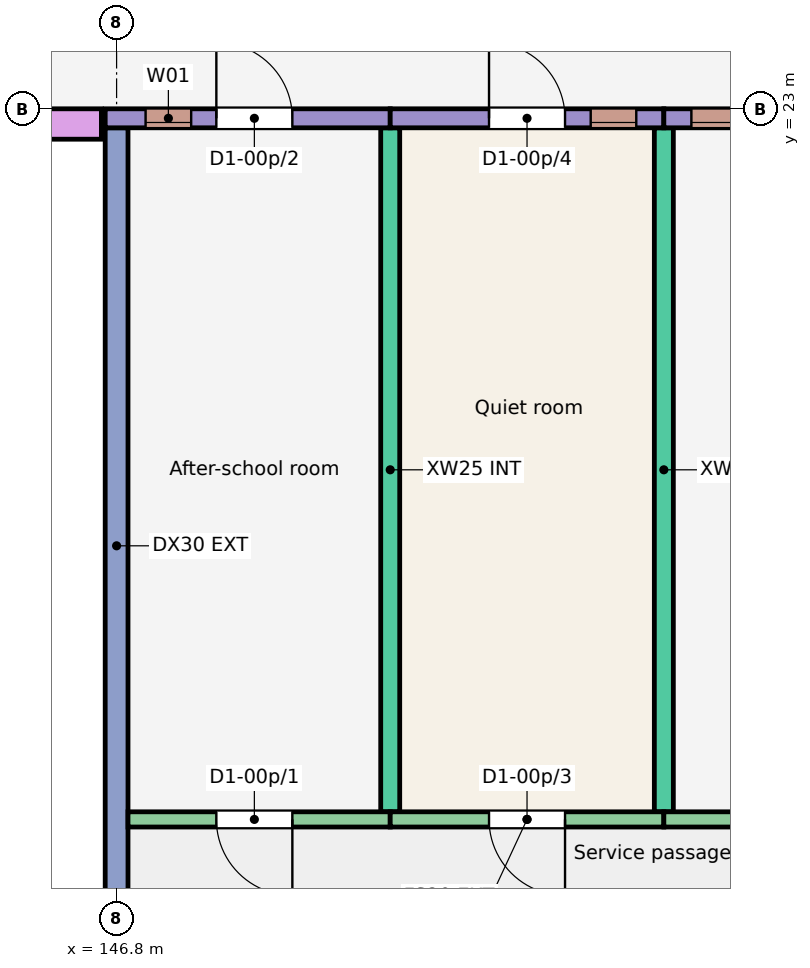
"""IFC4 building model, lengths in metres.
Left out: names, types, materials, properties, quantities, classifications, styles, units other than length and angle.
Written with IfcOpenShell. Run it as: python <this file> out.ifc"""

import sys

from ifc_helpers import new_model, si_unit, direction, frame, frame_2d, origin, place, context, subcontext, project, spatial, rectangle, extrude, element, fill, save


model = new_model("IFC4")
c1 = context("Model", 3, precision=1e-05, world=origin(), true_north=direction((0.0, 1.0)))
c2 = subcontext(c1, "Body", "Model", "MODEL_VIEW")
j1 = project(units=[si_unit("LENGTHUNIT", "METRE"), si_unit("PLANEANGLEUNIT", "RADIAN")], contexts=[c1])
p1 = place(None, origin())
s1 = spatial("IfcSite", under=j1, at=p1, CompositionType="ELEMENT")
p2 = place(p1, origin())
s2 = spatial("IfcBuilding", under=s1, at=p2, CompositionType="ELEMENT")
p3 = place(p2, origin())
s3 = spatial("IfcBuildingStorey", under=s2, at=p3, CompositionType="ELEMENT", Elevation=0.0)
p4 = place(p3, frame((146.8, 11.75, -0.25), z_axis=(0.0, 0.0, 1.0), x_axis=(0.0, 1.0, 0.0)))
e1 = element("IfcWall", 1, at=p4, inside=s3, PredefinedType="SHEAR", context=c2, shape_type="SweptSolid", body=[
    extrude(rectangle(XDim=11.0, YDim=0.3, at=frame_2d((5.5, 0.0))), origin(), (0.0, 0.0, 1.0), 3.25),
])
for number, where, z_axis, x_axis in (
    (2, (150.4, 13.75, -0.25), (0.0, 0.0, 1.0), (0.0, 1.0, 0.0)),
    (3, (154.0, 13.75, -0.25), (0.0, 0.0, 1.0), (0.0, 1.0, 0.0)),
):
    element("IfcWall", number, at=place(p3, frame(where, z_axis=z_axis, x_axis=x_axis)), inside=s3, PredefinedType="SHEAR", context=c2, shape_type="SweptSolid", body=[
        extrude(rectangle(XDim=9.0, YDim=0.25, at=frame_2d((4.5, 0.0))), origin(), (0.0, 0.0, 1.0), 3.25),
    ])
p5 = place(p3, frame((146.65, 22.875, -0.25), z_axis=(0.0, 0.0, 1.0), x_axis=(1.0, 0.0, 0.0)))
e4 = element("IfcWall", 4, at=p5, inside=s3, PredefinedType="SOLIDWALL", context=c2, shape_type="SweptSolid", body=[
    extrude(rectangle(XDim=3.75, YDim=0.25, at=frame_2d((1.875, 0.0))), origin(), (0.0, 0.0, 1.0), 3.25),
])
p6 = place(p5, frame((0.531, 0.0, 2.05)))
e5 = element("IfcOpeningElement", 5, at=p6, cuts=e4, PredefinedType="OPENING", context=c2, shape_type="SweptSolid", body=[
    extrude(rectangle(XDim=0.6, YDim=0.6, at=frame_2d((0.3, 0.3))), frame((0.0, 0.135, 0.0), z_axis=(0.0, -1.0, 0.0), x_axis=(1.0, 0.0, 0.0)), (0.0, 0.0, 1.0), 0.27),
])
p7 = place(p5, frame((1.462, 0.0, 0.25)))
e6 = element("IfcOpeningElement", 6, at=p7, cuts=e4, PredefinedType="OPENING", context=c2, shape_type="SweptSolid", body=[
    extrude(rectangle(XDim=1.0, YDim=2.1, at=frame_2d((0.5, 1.05))), frame((0.0, 0.135, 0.0), z_axis=(0.0, -1.0, 0.0), x_axis=(1.0, 0.0, 0.0)), (0.0, 0.0, 1.0), 0.27),
])
p8 = place(p3, frame((146.95, 13.65, -0.25), z_axis=(0.0, 0.0, 1.0), x_axis=(1.0, 0.0, 0.0)))
e7 = element("IfcWall", 7, at=p8, inside=s3, PredefinedType="SOLIDWALL", context=c2, shape_type="SweptSolid", body=[
    extrude(rectangle(XDim=3.45, YDim=0.2, at=frame_2d((1.725, 0.0))), origin(), (0.0, 0.0, 1.0), 3.25),
])
p9 = place(p8, frame((1.163, 0.0, 0.25)))
e8 = element("IfcOpeningElement", 8, at=p9, cuts=e7, PredefinedType="OPENING", context=c2, shape_type="SweptSolid", body=[
    extrude(rectangle(XDim=1.0, YDim=2.1, at=frame_2d((0.5, 1.05))), frame((0.0, 0.11, 0.0), z_axis=(0.0, -1.0, 0.0), x_axis=(1.0, 0.0, 0.0)), (0.0, 0.0, 1.0), 0.22),
])
p10 = place(p3, frame((150.4, 22.875, -0.25), z_axis=(0.0, 0.0, 1.0), x_axis=(1.0, 0.0, 0.0)))
e9 = element("IfcWall", 9, at=p10, inside=s3, PredefinedType="SOLIDWALL", context=c2, shape_type="SweptSolid", body=[
    extrude(rectangle(XDim=3.6, YDim=0.25, at=frame_2d((1.8, 0.0))), origin(), (0.0, 0.0, 1.0), 3.25),
])
p11 = place(p10, frame((2.637, 0.0, 2.05)))
e10 = element("IfcOpeningElement", 10, at=p11, cuts=e9, PredefinedType="OPENING", context=c2, shape_type="SweptSolid", body=[
    extrude(rectangle(XDim=0.6, YDim=0.6, at=frame_2d((0.3, 0.3))), frame((0.0, 0.135, 0.0), z_axis=(0.0, -1.0, 0.0), x_axis=(1.0, 0.0, 0.0)), (0.0, 0.0, 1.0), 0.27),
])
p12 = place(p10, frame((1.3, 0.0, 0.25)))
e11 = element("IfcOpeningElement", 11, at=p12, cuts=e9, PredefinedType="OPENING", context=c2, shape_type="SweptSolid", body=[
    extrude(rectangle(XDim=1.0, YDim=2.1, at=frame_2d((0.5, 1.05))), frame((0.0, 0.135, 0.0), z_axis=(0.0, -1.0, 0.0), x_axis=(1.0, 0.0, 0.0)), (0.0, 0.0, 1.0), 0.27),
])
p13 = place(p3, frame((150.4, 13.65, -0.25), z_axis=(0.0, 0.0, 1.0), x_axis=(1.0, 0.0, 0.0)))
e12 = element("IfcWall", 12, at=p13, inside=s3, PredefinedType="SOLIDWALL", context=c2, shape_type="SweptSolid", body=[
    extrude(rectangle(XDim=3.6, YDim=0.2, at=frame_2d((1.8, 0.0))), origin(), (0.0, 0.0, 1.0), 3.25),
])
p14 = place(p13, frame((1.3, 0.0, 0.25)))
e13 = element("IfcOpeningElement", 13, at=p14, cuts=e12, PredefinedType="OPENING", context=c2, shape_type="SweptSolid", body=[
    extrude(rectangle(XDim=1.0, YDim=2.1, at=frame_2d((0.5, 1.05))), frame((0.0, 0.11, 0.0), z_axis=(0.0, -1.0, 0.0), x_axis=(1.0, 0.0, 0.0)), (0.0, 0.0, 1.0), 0.22),
])
p15 = place(p3, frame((154.0, 22.875, -0.25), z_axis=(0.0, 0.0, 1.0), x_axis=(1.0, 0.0, 0.0)))
e14 = element("IfcWall", 14, at=p15, inside=s3, PredefinedType="SOLIDWALL", context=c2, shape_type="SweptSolid", body=[
    extrude(rectangle(XDim=3.6, YDim=0.25, at=frame_2d((1.8, 0.0))), origin(), (0.0, 0.0, 1.0), 3.25),
])
p16 = place(p15, frame((0.363, 0.0, 2.05)))
e15 = element("IfcOpeningElement", 15, at=p16, cuts=e14, PredefinedType="OPENING", context=c2, shape_type="SweptSolid", body=[
    extrude(rectangle(XDim=0.6, YDim=0.6, at=frame_2d((0.3, 0.3))), frame((0.0, 0.135, 0.0), z_axis=(0.0, -1.0, 0.0), x_axis=(1.0, 0.0, 0.0)), (0.0, 0.0, 1.0), 0.27),
])
p17 = place(p15, frame((1.3, 0.0, 0.25)))
e16 = element("IfcOpeningElement", 16, at=p17, cuts=e14, PredefinedType="OPENING", context=c2, shape_type="SweptSolid", body=[
    extrude(rectangle(XDim=1.0, YDim=2.1, at=frame_2d((0.5, 1.05))), frame((0.0, 0.135, 0.0), z_axis=(0.0, -1.0, 0.0), x_axis=(1.0, 0.0, 0.0)), (0.0, 0.0, 1.0), 0.27),
])
p18 = place(p3, frame((154.0, 13.65, -0.25), z_axis=(0.0, 0.0, 1.0), x_axis=(1.0, 0.0, 0.0)))
e17 = element("IfcWall", 17, at=p18, inside=s3, PredefinedType="SOLIDWALL", context=c2, shape_type="SweptSolid", body=[
    extrude(rectangle(XDim=3.6, YDim=0.2, at=frame_2d((1.8, 0.0))), origin(), (0.0, 0.0, 1.0), 3.25),
])
p19 = place(p18, frame((1.3, 0.0, 0.25)))
e18 = element("IfcOpeningElement", 18, at=p19, cuts=e17, PredefinedType="OPENING", context=c2, shape_type="SweptSolid", body=[
    extrude(rectangle(XDim=1.0, YDim=2.1, at=frame_2d((0.5, 1.05))), frame((0.0, 0.11, 0.0), z_axis=(0.0, -1.0, 0.0), x_axis=(1.0, 0.0, 0.0)), (0.0, 0.0, 1.0), 0.22),
])
p20 = place(p3, frame((132.8, 22.8, -0.25), z_axis=(0.0, 0.0, 1.0), x_axis=(1.0, 0.0, 0.0)))
e19 = element("IfcWall", 19, at=p20, inside=s3, PredefinedType="SOLIDWALL", context=c2, shape_type="SweptSolid", body=[
    extrude(rectangle(XDim=13.8, YDim=0.4, at=frame_2d((6.9, 0.0))), origin(), (0.0, 0.0, 1.0), 3.25),
])
p21 = place(p6, origin())
e20 = element("IfcWindow", 20, at=p21, inside=s3, PartitioningType="SINGLE_PANEL", PredefinedType="WINDOW", context=c2, shape_type="SweptSolid", body=[
    extrude(rectangle(XDim=0.6, YDim=0.6, at=frame_2d((0.3, 0.3))), frame((0.0, -0.025, 0.0), z_axis=(0.0, -1.0, 0.0), x_axis=(1.0, 0.0, 0.0)), (0.0, 0.0, 1.0), 0.06),
])
fill(e5, e20)
p22 = place(p11, origin())
e21 = element("IfcWindow", 21, at=p22, inside=s3, PartitioningType="SINGLE_PANEL", PredefinedType="WINDOW", context=c2, shape_type="SweptSolid", body=[
    extrude(rectangle(XDim=0.6, YDim=0.6, at=frame_2d((0.3, 0.3))), frame((0.0, -0.025, 0.0), z_axis=(0.0, -1.0, 0.0), x_axis=(1.0, 0.0, 0.0)), (0.0, 0.0, 1.0), 0.06),
])
fill(e10, e21)
p23 = place(p16, origin())
e22 = element("IfcWindow", 22, at=p23, inside=s3, PartitioningType="SINGLE_PANEL", PredefinedType="WINDOW", context=c2, shape_type="SweptSolid", body=[
    extrude(rectangle(XDim=0.6, YDim=0.6, at=frame_2d((0.3, 0.3))), frame((0.0, -0.025, 0.0), z_axis=(0.0, -1.0, 0.0), x_axis=(1.0, 0.0, 0.0)), (0.0, 0.0, 1.0), 0.06),
])
fill(e15, e22)
p24 = place(p9, origin())
e23 = element("IfcDoor", 23, at=p24, inside=s3, OperationType="SINGLE_SWING_RIGHT", PredefinedType="DOOR", context=c2, shape_type="SweptSolid", body=[
    extrude(rectangle(XDim=1.0, YDim=2.1, at=frame_2d((0.5, 1.05))), frame((0.0, 0.025, 0.0), z_axis=(0.0, -1.0, 0.0), x_axis=(1.0, 0.0, 0.0)), (0.0, 0.0, 1.0), 0.05),
])
fill(e8, e23)
p25 = place(p7, origin())
e24 = element("IfcDoor", 24, at=p25, inside=s3, OperationType="SINGLE_SWING_LEFT", PredefinedType="DOOR", context=c2, shape_type="SweptSolid", body=[
    extrude(rectangle(XDim=1.0, YDim=2.1, at=frame_2d((0.5, 1.05))), frame((0.0, 0.025, 0.0), z_axis=(0.0, -1.0, 0.0), x_axis=(1.0, 0.0, 0.0)), (0.0, 0.0, 1.0), 0.05),
])
fill(e6, e24)
p26 = place(p14, origin())
e25 = element("IfcDoor", 25, at=p26, inside=s3, OperationType="SINGLE_SWING_RIGHT", PredefinedType="DOOR", context=c2, shape_type="SweptSolid", body=[
    extrude(rectangle(XDim=1.0, YDim=2.1, at=frame_2d((0.5, 1.05))), frame((0.0, 0.025, 0.0), z_axis=(0.0, -1.0, 0.0), x_axis=(1.0, 0.0, 0.0)), (0.0, 0.0, 1.0), 0.05),
])
fill(e13, e25)
p27 = place(p12, origin())
e26 = element("IfcDoor", 26, at=p27, inside=s3, OperationType="SINGLE_SWING_LEFT", PredefinedType="DOOR", context=c2, shape_type="SweptSolid", body=[
    extrude(rectangle(XDim=1.0, YDim=2.1, at=frame_2d((0.5, 1.05))), frame((0.0, 0.025, 0.0), z_axis=(0.0, -1.0, 0.0), x_axis=(1.0, 0.0, 0.0)), (0.0, 0.0, 1.0), 0.05),
])
fill(e11, e26)
save(model, sys.argv[1])
